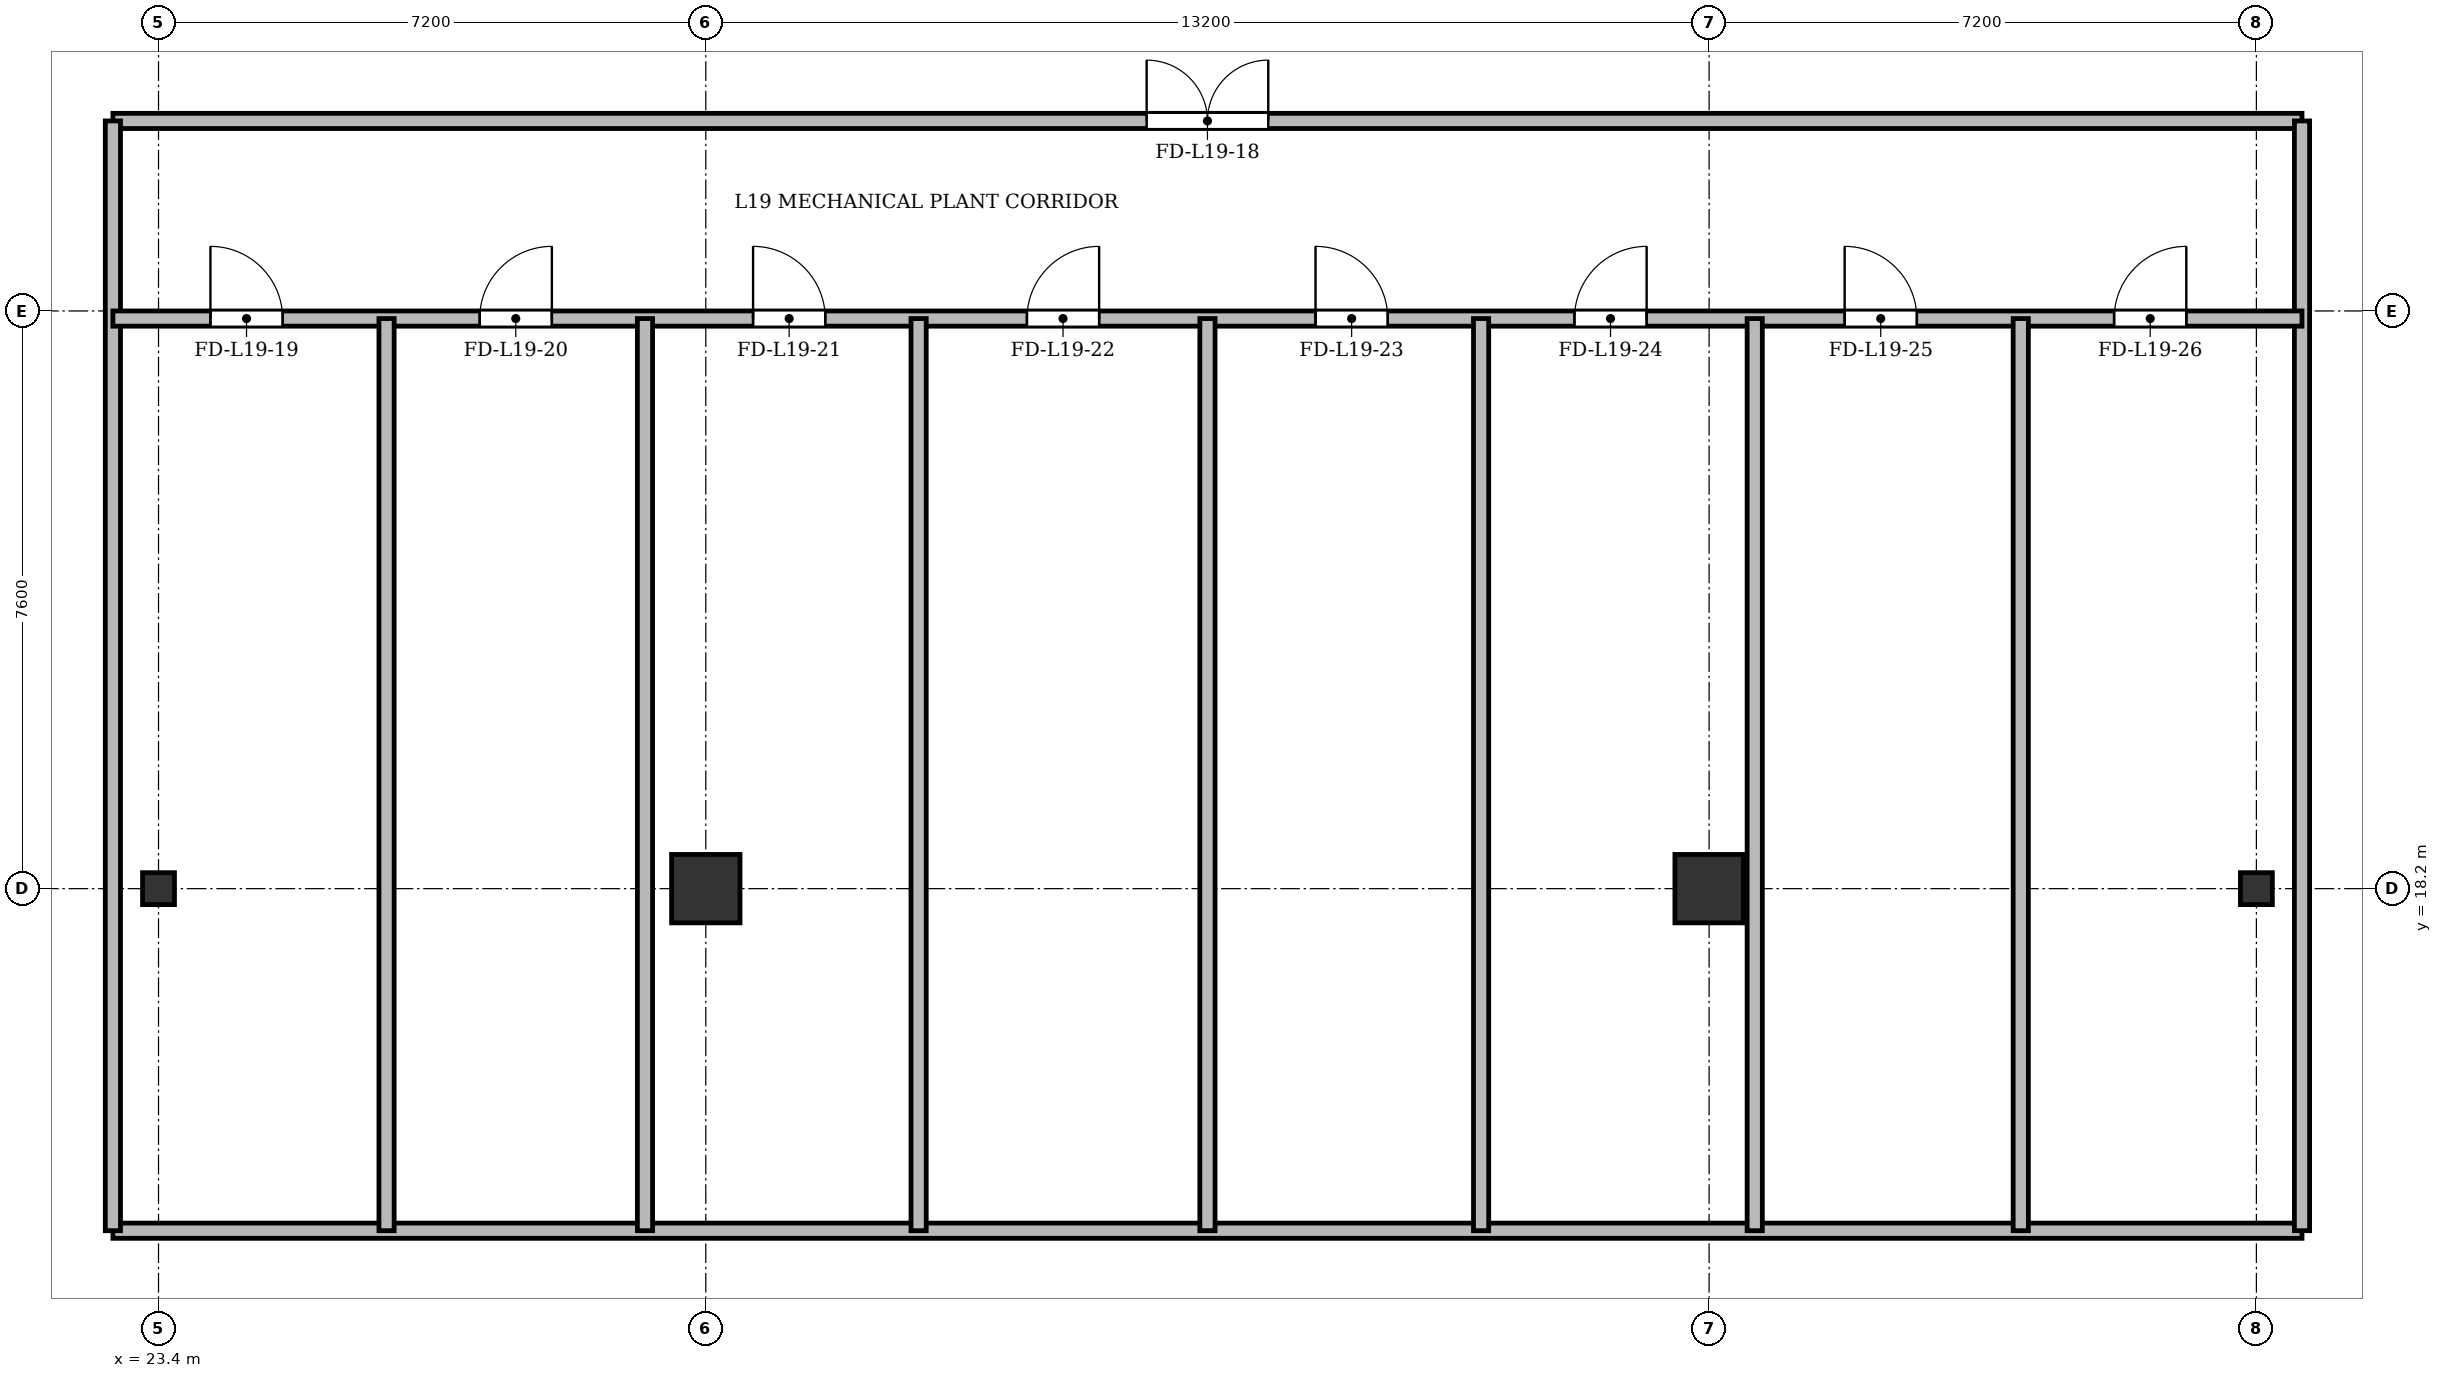
"""IFC4 building model, lengths in metres.
Left out: names, types, materials, properties, quantities, classifications, styles, units other than length and angle.
Written with IfcOpenShell. Run it as: python <this file> out.ifc"""

import sys

from ifc_helpers import new_model, si_unit, direction, frame, frame_2d, origin, origin_2d, place, context, subcontext, project, spatial, rectangle, i_section, extrude, source, transform, mapped, element, fill, save


model = new_model("IFC4")
c1 = context("Model", 3, precision=1e-05, world=origin(), true_north=direction((0.0, 1.0)))
c2 = subcontext(c1, "Body", "Model", "MODEL_VIEW")
j1 = project(units=[si_unit("LENGTHUNIT", "METRE"), si_unit("PLANEANGLEUNIT", "RADIAN")], contexts=[c1])
p1 = place(None, origin())
s1 = spatial("IfcSite", under=j1, at=p1, CompositionType="ELEMENT")
p2 = place(p1, origin())
s2 = spatial("IfcBuilding", under=s1, at=p2, CompositionType="ELEMENT")
p3 = place(p2, frame((0.0, 0.0, 73.9)))
s3 = spatial("IfcBuildingStorey", under=s2, at=p3, CompositionType="ELEMENT", Elevation=73.9)
m1 = source(origin(), c2, "Body", "SweptSolid", [
    extrude(i_section(OverallWidth=0.42, OverallDepth=0.42, WebThickness=0.026, FlangeThickness=0.04, at=origin_2d()), origin(), (0.0, 0.0, 1.0), 7.8),
])
p4 = place(p3, frame((23.4, 18.2, 0.0), z_axis=(0.0, 0.0, 1.0), x_axis=(1.0, 0.0, 0.0)))
e1 = element("IfcColumn", 1, at=p4, inside=s3, PredefinedType="COLUMN", context=c2, shape_type="MappedRepresentation", body=[
    mapped(m1, transform((0.0, 0.0, 0.0), x_axis=(1.0, 0.0, 0.0), y_axis=(0.0, 1.0, 0.0), z_axis=(0.0, 0.0, 1.0), scale=1.0)),
])
m2 = source(origin(), c2, "Body", "SweptSolid", [
    extrude(rectangle(XDim=0.9, YDim=0.9, at=origin_2d()), origin(), (0.0, 0.0, 1.0), 7.8),
])
for number, where, z_axis, x_axis in (
    (2, (30.6, 18.2, 0.0), (0.0, 0.0, 1.0), (1.0, 0.0, 0.0)),
    (3, (43.8, 18.2, 0.0), (0.0, 0.0, 1.0), (1.0, 0.0, 0.0)),
):
    element("IfcColumn", number, at=place(p3, frame(where, z_axis=z_axis, x_axis=x_axis)), inside=s3, PredefinedType="COLUMN", context=c2, shape_type="MappedRepresentation", body=[
        mapped(m2, transform((0.0, 0.0, 0.0), x_axis=(1.0, 0.0, 0.0), y_axis=(0.0, 1.0, 0.0), z_axis=(0.0, 0.0, 1.0), scale=1.0)),
    ])
p5 = place(p3, frame((51.0, 18.2, 0.0), z_axis=(0.0, 0.0, 1.0), x_axis=(1.0, 0.0, 0.0)))
e4 = element("IfcColumn", 4, at=p5, inside=s3, PredefinedType="COLUMN", context=c2, shape_type="MappedRepresentation", body=[
    mapped(m1, transform((0.0, 0.0, 0.0), x_axis=(1.0, 0.0, 0.0), y_axis=(0.0, 1.0, 0.0), z_axis=(0.0, 0.0, 1.0), scale=1.0)),
])
p6 = place(p3, frame((22.8, 28.3, 0.0), z_axis=(0.0, 0.0, 1.0), x_axis=(1.0, 0.0, 0.0)))
e5 = element("IfcWall", 5, at=p6, inside=s3, PredefinedType="PARTITIONING", context=c2, shape_type="SweptSolid", body=[
    extrude(rectangle(XDim=28.8, YDim=0.2, at=frame_2d((14.4, 0.0))), origin(), (0.0, 0.0, 1.0), 6.832),
])
p7 = place(p6, frame((13.6, 0.0, 0.0)))
e6 = element("IfcOpeningElement", 6, at=p7, cuts=e5, PredefinedType="OPENING", context=c2, shape_type="SweptSolid", body=[
    extrude(rectangle(XDim=1.6, YDim=2.2, at=frame_2d((0.8, 1.1))), frame((0.0, 0.11, 0.0), z_axis=(0.0, -1.0, 0.0), x_axis=(1.0, 0.0, 0.0)), (0.0, 0.0, 1.0), 0.22),
])
p8 = place(p3, frame((22.8, 13.7, 0.0), z_axis=(0.0, 0.0, 1.0), x_axis=(1.0, 0.0, 0.0)))
e7 = element("IfcWall", 7, at=p8, inside=s3, PredefinedType="PARTITIONING", context=c2, shape_type="SweptSolid", body=[
    extrude(rectangle(XDim=28.8, YDim=0.2, at=frame_2d((14.4, 0.0))), origin(), (0.0, 0.0, 1.0), 6.832),
])
for number, where, z_axis, x_axis in (
    (8, (22.8, 13.7, 0.0), (0.0, 0.0, 1.0), (0.0, 1.0, 0.0)),
    (9, (51.6, 13.7, 0.0), (0.0, 0.0, 1.0), (0.0, 1.0, 0.0)),
):
    element("IfcWall", number, at=place(p3, frame(where, z_axis=z_axis, x_axis=x_axis)), inside=s3, PredefinedType="PARTITIONING", context=c2, shape_type="SweptSolid", body=[
        extrude(rectangle(XDim=14.6, YDim=0.2, at=frame_2d((7.3, 0.0))), origin(), (0.0, 0.0, 1.0), 6.77),
    ])
p9 = place(p3, frame((22.8, 25.7, 0.0), z_axis=(0.0, 0.0, 1.0), x_axis=(1.0, 0.0, 0.0)))
e10 = element("IfcWall", 10, at=p9, inside=s3, PredefinedType="PARTITIONING", context=c2, shape_type="SweptSolid", body=[
    extrude(rectangle(XDim=28.8, YDim=0.2, at=frame_2d((14.4, 0.0))), origin(), (0.0, 0.0, 1.0), 6.832),
])
p10 = place(p9, frame((1.283, 0.0, 0.0)))
e11 = element("IfcOpeningElement", 11, at=p10, cuts=e10, PredefinedType="OPENING", context=c2, shape_type="SweptSolid", body=[
    extrude(rectangle(XDim=0.95, YDim=2.15, at=frame_2d((0.475, 1.075))), frame((0.0, 0.11, 0.0), z_axis=(0.0, -1.0, 0.0), x_axis=(1.0, 0.0, 0.0)), (0.0, 0.0, 1.0), 0.22),
])
p11 = place(p9, frame((4.825, 0.0, 0.0)))
e12 = element("IfcOpeningElement", 12, at=p11, cuts=e10, PredefinedType="OPENING", context=c2, shape_type="SweptSolid", body=[
    extrude(rectangle(XDim=0.95, YDim=2.15, at=frame_2d((0.475, 1.075))), frame((0.0, 0.11, 0.0), z_axis=(0.0, -1.0, 0.0), x_axis=(1.0, 0.0, 0.0)), (0.0, 0.0, 1.0), 0.22),
])
p12 = place(p9, frame((8.422, 0.0, 0.0)))
e13 = element("IfcOpeningElement", 13, at=p12, cuts=e10, PredefinedType="OPENING", context=c2, shape_type="SweptSolid", body=[
    extrude(rectangle(XDim=0.95, YDim=2.15, at=frame_2d((0.475, 1.075))), frame((0.0, 0.11, 0.0), z_axis=(0.0, -1.0, 0.0), x_axis=(1.0, 0.0, 0.0)), (0.0, 0.0, 1.0), 0.22),
])
p13 = place(p9, frame((12.025, 0.0, 0.0)))
e14 = element("IfcOpeningElement", 14, at=p13, cuts=e10, PredefinedType="OPENING", context=c2, shape_type="SweptSolid", body=[
    extrude(rectangle(XDim=0.95, YDim=2.15, at=frame_2d((0.475, 1.075))), frame((0.0, 0.11, 0.0), z_axis=(0.0, -1.0, 0.0), x_axis=(1.0, 0.0, 0.0)), (0.0, 0.0, 1.0), 0.22),
])
p14 = place(p9, frame((15.822, 0.0, 0.0)))
e15 = element("IfcOpeningElement", 15, at=p14, cuts=e10, PredefinedType="OPENING", context=c2, shape_type="SweptSolid", body=[
    extrude(rectangle(XDim=0.95, YDim=2.15, at=frame_2d((0.475, 1.075))), frame((0.0, 0.11, 0.0), z_axis=(0.0, -1.0, 0.0), x_axis=(1.0, 0.0, 0.0)), (0.0, 0.0, 1.0), 0.22),
])
p15 = place(p9, frame((19.228, 0.0, 0.0)))
e16 = element("IfcOpeningElement", 16, at=p15, cuts=e10, PredefinedType="OPENING", context=c2, shape_type="SweptSolid", body=[
    extrude(rectangle(XDim=0.95, YDim=2.15, at=frame_2d((0.475, 1.075))), frame((0.0, 0.11, 0.0), z_axis=(0.0, -1.0, 0.0), x_axis=(1.0, 0.0, 0.0)), (0.0, 0.0, 1.0), 0.22),
])
p16 = place(p9, frame((22.783, 0.0, 0.0)))
e17 = element("IfcOpeningElement", 17, at=p16, cuts=e10, PredefinedType="OPENING", context=c2, shape_type="SweptSolid", body=[
    extrude(rectangle(XDim=0.95, YDim=2.15, at=frame_2d((0.475, 1.075))), frame((0.0, 0.11, 0.0), z_axis=(0.0, -1.0, 0.0), x_axis=(1.0, 0.0, 0.0)), (0.0, 0.0, 1.0), 0.22),
])
p17 = place(p9, frame((26.328, 0.0, 0.0)))
e18 = element("IfcOpeningElement", 18, at=p17, cuts=e10, PredefinedType="OPENING", context=c2, shape_type="SweptSolid", body=[
    extrude(rectangle(XDim=0.95, YDim=2.15, at=frame_2d((0.475, 1.075))), frame((0.0, 0.11, 0.0), z_axis=(0.0, -1.0, 0.0), x_axis=(1.0, 0.0, 0.0)), (0.0, 0.0, 1.0), 0.22),
])
for number, where, z_axis, x_axis in (
    (19, (26.4, 13.7, 0.0), (0.0, 0.0, 1.0), (0.0, 1.0, 0.0)),
    (20, (29.8, 13.7, 0.0), (0.0, 0.0, 1.0), (0.0, 1.0, 0.0)),
    (21, (33.4, 13.7, 0.0), (0.0, 0.0, 1.0), (0.0, 1.0, 0.0)),
    (22, (37.2, 13.7, 0.0), (0.0, 0.0, 1.0), (0.0, 1.0, 0.0)),
    (23, (40.8, 13.7, 0.0), (0.0, 0.0, 1.0), (0.0, 1.0, 0.0)),
    (24, (44.4, 13.7, 0.0), (0.0, 0.0, 1.0), (0.0, 1.0, 0.0)),
    (25, (47.9, 13.7, 0.0), (0.0, 0.0, 1.0), (0.0, 1.0, 0.0)),
):
    element("IfcWall", number, at=place(p3, frame(where, z_axis=z_axis, x_axis=x_axis)), inside=s3, PredefinedType="PARTITIONING", context=c2, shape_type="SweptSolid", body=[
        extrude(rectangle(XDim=12.0, YDim=0.2, at=frame_2d((6.0, 0.0))), origin(), (0.0, 0.0, 1.0), 6.77),
    ])
m3 = source(origin(), c2, "Body", "SweptSolid", [
    extrude(rectangle(XDim=1.6, YDim=2.2, at=frame_2d((0.8, 1.1))), frame((0.0, 0.025, 0.0), z_axis=(0.0, -1.0, 0.0), x_axis=(1.0, 0.0, 0.0)), (0.0, 0.0, 1.0), 0.05),
])
p18 = place(p7, origin())
e26 = element("IfcDoor", 26, at=p18, inside=s3, OperationType="DOUBLE_DOOR_SINGLE_SWING", PredefinedType="DOOR", context=c2, shape_type="MappedRepresentation", body=[
    mapped(m3, transform((0.0, 0.0, 0.0), x_axis=(1.0, 0.0, 0.0), y_axis=(0.0, 1.0, 0.0), z_axis=(0.0, 0.0, 1.0), scale=1.0)),
])
fill(e6, e26)
m4 = source(origin(), c2, "Body", "SweptSolid", [
    extrude(rectangle(XDim=0.95, YDim=2.15, at=frame_2d((0.475, 1.075))), frame((0.0, 0.025, 0.0), z_axis=(0.0, -1.0, 0.0), x_axis=(1.0, 0.0, 0.0)), (0.0, 0.0, 1.0), 0.05),
])
p19 = place(p10, origin())
e27 = element("IfcDoor", 27, at=p19, inside=s3, OperationType="SINGLE_SWING_LEFT", PredefinedType="DOOR", context=c2, shape_type="MappedRepresentation", body=[
    mapped(m4, transform((0.0, 0.0, 0.0), x_axis=(1.0, 0.0, 0.0), y_axis=(0.0, 1.0, 0.0), z_axis=(0.0, 0.0, 1.0), scale=1.0)),
])
fill(e11, e27)
p20 = place(p11, origin())
e28 = element("IfcDoor", 28, at=p20, inside=s3, OperationType="SINGLE_SWING_RIGHT", PredefinedType="DOOR", context=c2, shape_type="MappedRepresentation", body=[
    mapped(m4, transform((0.0, 0.0, 0.0), x_axis=(1.0, 0.0, 0.0), y_axis=(0.0, 1.0, 0.0), z_axis=(0.0, 0.0, 1.0), scale=1.0)),
])
fill(e12, e28)
p21 = place(p12, origin())
e29 = element("IfcDoor", 29, at=p21, inside=s3, OperationType="SINGLE_SWING_LEFT", PredefinedType="DOOR", context=c2, shape_type="MappedRepresentation", body=[
    mapped(m4, transform((0.0, 0.0, 0.0), x_axis=(1.0, 0.0, 0.0), y_axis=(0.0, 1.0, 0.0), z_axis=(0.0, 0.0, 1.0), scale=1.0)),
])
fill(e13, e29)
p22 = place(p13, origin())
e30 = element("IfcDoor", 30, at=p22, inside=s3, OperationType="SINGLE_SWING_RIGHT", PredefinedType="DOOR", context=c2, shape_type="MappedRepresentation", body=[
    mapped(m4, transform((0.0, 0.0, 0.0), x_axis=(1.0, 0.0, 0.0), y_axis=(0.0, 1.0, 0.0), z_axis=(0.0, 0.0, 1.0), scale=1.0)),
])
fill(e14, e30)
p23 = place(p14, origin())
e31 = element("IfcDoor", 31, at=p23, inside=s3, OperationType="SINGLE_SWING_LEFT", PredefinedType="DOOR", context=c2, shape_type="MappedRepresentation", body=[
    mapped(m4, transform((0.0, 0.0, 0.0), x_axis=(1.0, 0.0, 0.0), y_axis=(0.0, 1.0, 0.0), z_axis=(0.0, 0.0, 1.0), scale=1.0)),
])
fill(e15, e31)
p24 = place(p15, origin())
e32 = element("IfcDoor", 32, at=p24, inside=s3, OperationType="SINGLE_SWING_RIGHT", PredefinedType="DOOR", context=c2, shape_type="MappedRepresentation", body=[
    mapped(m4, transform((0.0, 0.0, 0.0), x_axis=(1.0, 0.0, 0.0), y_axis=(0.0, 1.0, 0.0), z_axis=(0.0, 0.0, 1.0), scale=1.0)),
])
fill(e16, e32)
p25 = place(p16, origin())
e33 = element("IfcDoor", 33, at=p25, inside=s3, OperationType="SINGLE_SWING_LEFT", PredefinedType="DOOR", context=c2, shape_type="MappedRepresentation", body=[
    mapped(m4, transform((0.0, 0.0, 0.0), x_axis=(1.0, 0.0, 0.0), y_axis=(0.0, 1.0, 0.0), z_axis=(0.0, 0.0, 1.0), scale=1.0)),
])
fill(e17, e33)
p26 = place(p17, origin())
e34 = element("IfcDoor", 34, at=p26, inside=s3, OperationType="SINGLE_SWING_RIGHT", PredefinedType="DOOR", context=c2, shape_type="MappedRepresentation", body=[
    mapped(m4, transform((0.0, 0.0, 0.0), x_axis=(1.0, 0.0, 0.0), y_axis=(0.0, 1.0, 0.0), z_axis=(0.0, 0.0, 1.0), scale=1.0)),
])
fill(e18, e34)
save(model, sys.argv[1])
